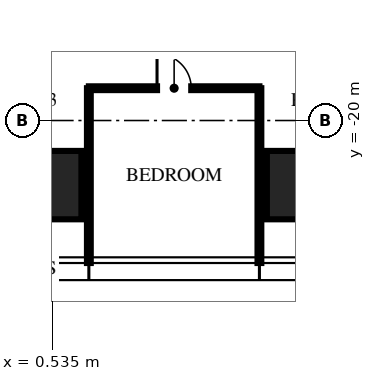
"""IFC4 building model, lengths in metres.
Left out: names, types, materials, properties, quantities, classifications, styles, units other than length and angle.
Written with IfcOpenShell. Run it as: python <this file> out.ifc"""

import sys

from ifc_helpers import new_model, si_unit, direction, frame, frame_2d, origin, origin_2d, place, context, subcontext, project, spatial, rectangle, extrude, element, fill, save


model = new_model("IFC4")
c1 = context("Model", 3, precision=1e-05, world=origin(), true_north=direction((0.0, 1.0)))
c2 = subcontext(c1, "Body", "Model", "MODEL_VIEW")
j1 = project(units=[si_unit("LENGTHUNIT", "METRE"), si_unit("PLANEANGLEUNIT", "RADIAN")], contexts=[c1])
p1 = place(None, origin())
s1 = spatial("IfcSite", under=j1, at=p1, CompositionType="ELEMENT")
p2 = place(p1, origin())
s2 = spatial("IfcBuilding", under=s1, at=p2, CompositionType="ELEMENT")
p3 = place(p2, frame((0.0, 0.0, 293.25)))
s3 = spatial("IfcBuildingStorey", under=s2, at=p3, CompositionType="ELEMENT", Elevation=293.25)
for number, where, z_axis, x_axis in (
    (1, (7.48, -21.7, 0.0), (0.0, 0.0, 1.0), (1.0, 0.0, 0.0)),
    (2, (0.0, -21.7, 0.0), (0.0, 0.0, 1.0), (1.0, 0.0, 0.0)),
):
    element("IfcColumn", number, at=place(p3, frame(where, z_axis=z_axis, x_axis=x_axis)), inside=s3, PredefinedType="COLUMN", context=c2, shape_type="SweptSolid", body=[
        extrude(rectangle(XDim=2.6, YDim=1.8, at=origin_2d()), origin(), (0.0, 0.0, 1.0), 3.75),
    ])
for number, where, z_axis, x_axis in (
    (3, (1.496, -19.15, 0.0), (0.0, 0.0, 1.0), (0.0, -1.0, 0.0)),
    (4, (5.984, -19.15, 0.0), (0.0, 0.0, 1.0), (0.0, -1.0, 0.0)),
):
    element("IfcWall", number, at=place(p3, frame(where, z_axis=z_axis, x_axis=x_axis)), inside=s3, PredefinedType="PARTITIONING", context=c2, shape_type="SweptSolid", body=[
        extrude(rectangle(XDim=4.6, YDim=0.1, at=frame_2d((2.3, 0.0))), origin(), (0.0, 0.0, 1.0), 3.01),
    ])
p4 = place(p3, frame((1.496, -19.15, 0.0), z_axis=(0.0, 0.0, 1.0), x_axis=(1.0, 0.0, 0.0)))
e5 = element("IfcWall", 5, at=p4, inside=s3, PredefinedType="PARTITIONING", context=c2, shape_type="SweptSolid", body=[
    extrude(rectangle(XDim=4.488, YDim=0.1, at=frame_2d((2.244, 0.0))), origin(), (0.0, 0.0, 1.0), 2.91),
])
p5 = place(p4, frame((1.794, 0.0, 0.0)))
e6 = element("IfcOpeningElement", 6, at=p5, cuts=e5, PredefinedType="OPENING", context=c2, shape_type="SweptSolid", body=[
    extrude(rectangle(XDim=0.9, YDim=2.1, at=frame_2d((0.45, 1.05))), frame((0.0, 0.06, 0.0), z_axis=(0.0, -1.0, 0.0), x_axis=(1.0, 0.0, 0.0)), (0.0, 0.0, 1.0), 0.12),
])
p6 = place(p5, origin())
e7 = element("IfcDoor", 7, at=p6, inside=s3, OperationType="SINGLE_SWING_LEFT", PredefinedType="DOOR", context=c2, shape_type="SweptSolid", body=[
    extrude(rectangle(XDim=0.9, YDim=2.1, at=frame_2d((0.45, 1.05))), frame((0.0, 0.025, 0.0), z_axis=(0.0, -1.0, 0.0), x_axis=(1.0, 0.0, 0.0)), (0.0, 0.0, 1.0), 0.05),
])
fill(e6, e7)
save(model, sys.argv[1])
